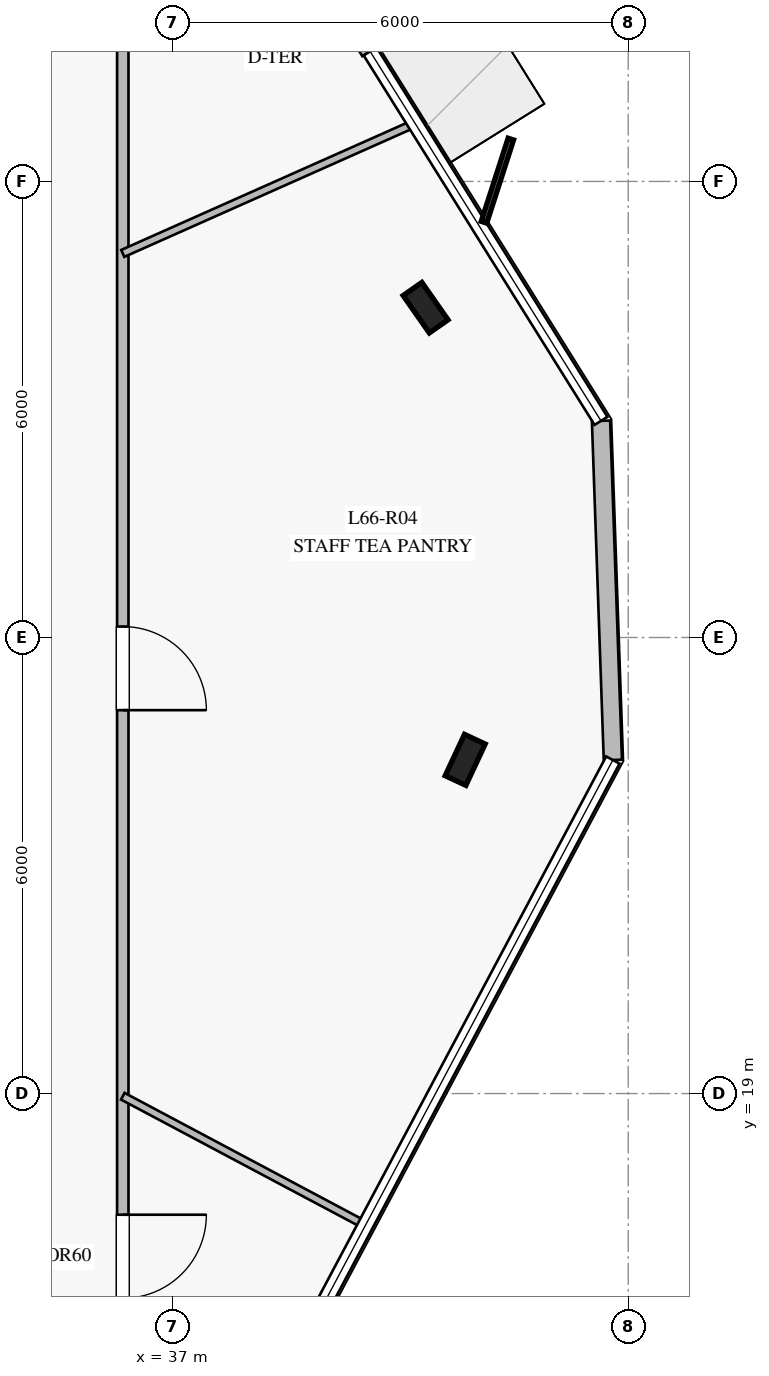
"""IFC4 building model, lengths in metres.
Left out: names, types, materials, properties, quantities, classifications, styles, units other than length and angle.
Written with IfcOpenShell. Run it as: python <this file> out.ifc"""

import sys

from ifc_helpers import new_model, si_unit, direction, frame, frame_2d, origin, origin_2d, place, context, subcontext, project, spatial, rectangle, i_section, extrude, element, fill, save


model = new_model("IFC4")
c1 = context("Model", 3, precision=1e-05, world=origin(), true_north=direction((0.0, 1.0)))
c2 = subcontext(c1, "Body", "Model", "MODEL_VIEW")
j1 = project(units=[si_unit("LENGTHUNIT", "METRE"), si_unit("PLANEANGLEUNIT", "RADIAN")], contexts=[c1])
p1 = place(None, origin())
s1 = spatial("IfcSite", under=j1, at=p1, CompositionType="ELEMENT")
p2 = place(p1, origin())
s2 = spatial("IfcBuilding", under=s1, at=p2, CompositionType="ELEMENT")
p3 = place(p2, frame((0.0, 0.0, 274.2)))
s3 = spatial("IfcBuildingStorey", under=s2, at=p3, CompositionType="ELEMENT", Elevation=274.2)
for number, where, z_axis, x_axis in (
    (1, (40.855, 23.39, 0.0), (0.0, 0.0, 1.0), (0.423, 0.906, 0.0)),
    (2, (40.334, 29.339, 0.0), (0.0, 0.0, 1.0), (-0.574, 0.819, 0.0)),
):
    element("IfcColumn", number, at=place(p3, frame(where, z_axis=z_axis, x_axis=x_axis)), inside=s3, PredefinedType="COLUMN", context=c2, shape_type="SweptSolid", body=[
        extrude(i_section(OverallWidth=0.3, OverallDepth=0.6, WebThickness=0.015, FlangeThickness=0.03, at=origin_2d()), origin(), (0.0, 0.0, 1.0), 4.0),
    ])
p4 = place(p3, frame((42.798, 23.388, 0.0), z_axis=(0.0, 0.0, 1.0), x_axis=(-0.034940625932, 0.999389389907, 0.0)))
e3 = element("IfcWall", 3, at=p4, inside=s3, PredefinedType="STANDARD", context=c2, shape_type="SweptSolid", body=[
    extrude(rectangle(XDim=4.465, YDim=0.24, at=frame_2d((2.232, 0.0))), origin(), (0.0, 0.0, 1.0), 3.78),
])
p5 = place(p3, frame((39.604, 32.711, 0.0), z_axis=(0.0, 0.0, 1.0), x_axis=(-0.529706236636, 0.848181173376, 0.0)))
e4 = element("IfcWall", 4, at=p5, inside=s3, PredefinedType="STANDARD", context=c2, shape_type="SweptSolid", body=[
    extrude(rectangle(XDim=2.399, YDim=0.24, at=frame_2d((1.2, 0.0))), origin(), (0.0, 0.0, 1.0), 3.78),
])
p6 = place(p5, frame((0.4, 0.0, 0.0)))
e5 = element("IfcOpeningElement", 5, at=p6, cuts=e4, PredefinedType="OPENING", context=c2, shape_type="SweptSolid", body=[
    extrude(rectangle(XDim=1.6, YDim=2.25, at=frame_2d((0.8, 1.125))), frame((0.0, 0.13, 0.0), z_axis=(0.0, -1.0, 0.0), x_axis=(1.0, 0.0, 0.0)), (0.0, 0.0, 1.0), 0.26),
])
p7 = place(p3, frame((36.35, 35.75, 0.0), z_axis=(0.0, 0.0, 1.0), x_axis=(0.0, -1.0, 0.0)))
e6 = element("IfcWall", 6, at=p7, inside=s3, PredefinedType="PARTITIONING", context=c2, shape_type="SweptSolid", body=[
    extrude(rectangle(XDim=21.5, YDim=0.15, at=frame_2d((10.75, 0.0))), origin(), (0.0, 0.0, 1.0), 3.28),
])
p8 = place(p7, frame((18.344, 0.0, 0.0)))
e7 = element("IfcOpeningElement", 7, at=p8, cuts=e6, PredefinedType="OPENING", context=c2, shape_type="SweptSolid", body=[
    extrude(rectangle(XDim=1.1, YDim=2.2, at=frame_2d((0.55, 1.1))), frame((0.0, 0.085, 0.0), z_axis=(0.0, -1.0, 0.0), x_axis=(1.0, 0.0, 0.0)), (0.0, 0.0, 1.0), 0.17),
])
p9 = place(p7, frame((10.606, 0.0, 0.0)))
e8 = element("IfcOpeningElement", 8, at=p9, cuts=e6, PredefinedType="OPENING", context=c2, shape_type="SweptSolid", body=[
    extrude(rectangle(XDim=1.1, YDim=2.2, at=frame_2d((0.55, 1.1))), frame((0.0, 0.085, 0.0), z_axis=(0.0, -1.0, 0.0), x_axis=(1.0, 0.0, 0.0)), (0.0, 0.0, 1.0), 0.17),
])
p10 = place(p3, frame((36.35, 18.965, 0.0), z_axis=(0.0, 0.0, 1.0), x_axis=(0.882958513107, -0.46945102421, 0.0)))
e9 = element("IfcWall", 9, at=p10, inside=s3, PredefinedType="MOVABLE", context=c2, shape_type="SweptSolid", body=[
    extrude(rectangle(XDim=3.6, YDim=0.1, at=frame_2d((1.8, 0.0))), origin(), (0.0, 0.0, 1.0), 3.28),
])
p11 = place(p3, frame((36.35, 30.053, 0.0), z_axis=(0.0, 0.0, 1.0), x_axis=(0.91359052296, 0.40663540962, 0.0)))
e10 = element("IfcWall", 10, at=p11, inside=s3, PredefinedType="MOVABLE", context=c2, shape_type="SweptSolid", body=[
    extrude(rectangle(XDim=4.193, YDim=0.1, at=frame_2d((2.097, 0.0))), origin(), (0.0, 0.0, 1.0), 3.28),
])
p12 = place(p8, origin())
e11 = element("IfcDoor", 11, at=p12, inside=s3, OperationType="SINGLE_SWING_LEFT", PredefinedType="DOOR", context=c2, shape_type="SweptSolid", body=[
    extrude(rectangle(XDim=1.1, YDim=2.2, at=frame_2d((0.55, 1.1))), frame((0.0, 0.025, 0.0), z_axis=(0.0, -1.0, 0.0), x_axis=(1.0, 0.0, 0.0)), (0.0, 0.0, 1.0), 0.05),
])
fill(e7, e11)
p13 = place(p9, origin())
e12 = element("IfcDoor", 12, at=p13, inside=s3, OperationType="SINGLE_SWING_RIGHT", PredefinedType="DOOR", context=c2, shape_type="SweptSolid", body=[
    extrude(rectangle(XDim=1.1, YDim=2.2, at=frame_2d((0.55, 1.1))), frame((0.0, 0.025, 0.0), z_axis=(0.0, -1.0, 0.0), x_axis=(1.0, 0.0, 0.0)), (0.0, 0.0, 1.0), 0.05),
])
fill(e8, e12)
save(model, sys.argv[1])
